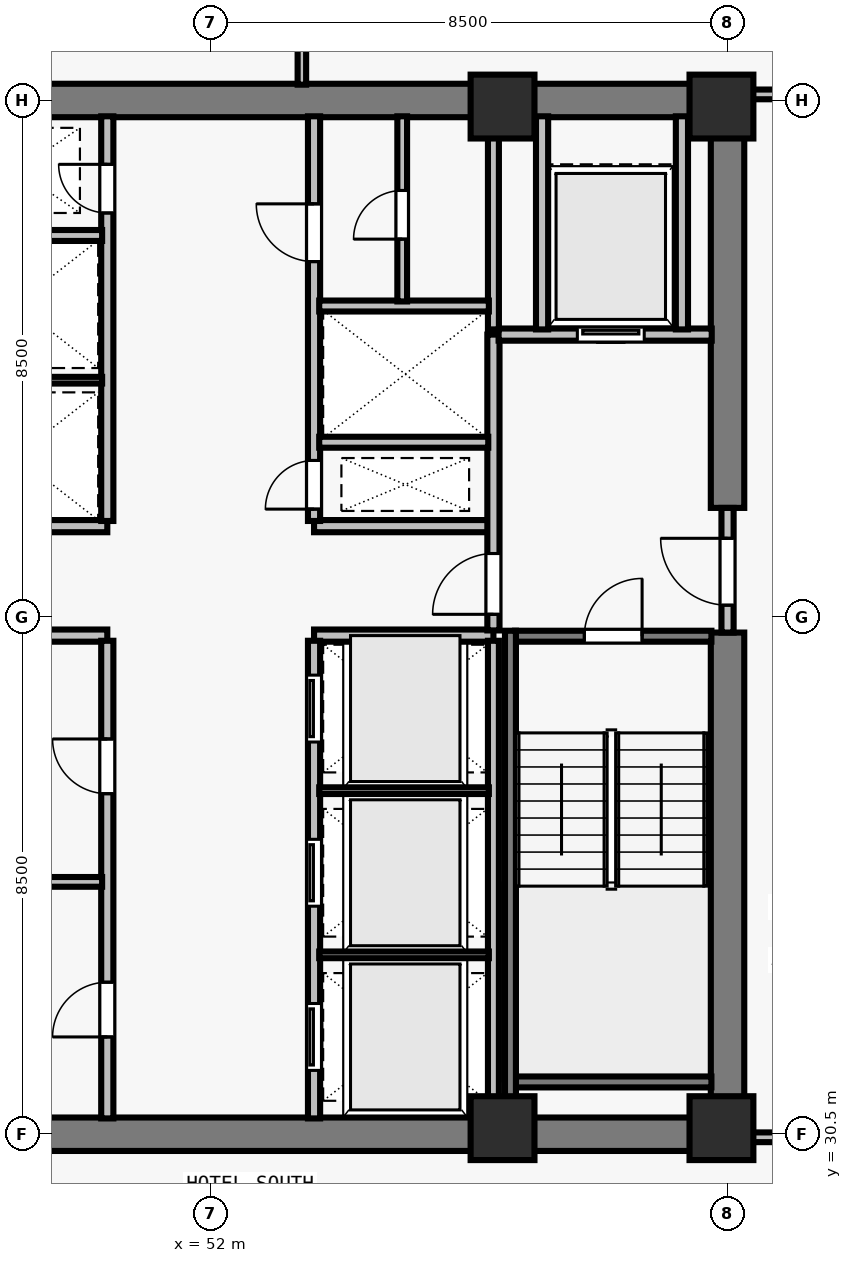
"""IFC4 building model, lengths in metres.
Left out: names, types, materials, properties, quantities, classifications, styles, units other than length and angle.
Written with IfcOpenShell. Run it as: python <this file> out.ifc"""

import sys

from ifc_helpers import new_model, si_unit, direction, frame, frame_2d, origin, origin_2d, place, context, subcontext, project, spatial, rectangle, extrude, element, fill, save


model = new_model("IFC4")
c1 = context("Model", 3, precision=1e-05, world=origin(), true_north=direction((0.0, 1.0)))
c2 = subcontext(c1, "Body", "Model", "MODEL_VIEW")
j1 = project(units=[si_unit("LENGTHUNIT", "METRE"), si_unit("PLANEANGLEUNIT", "RADIAN")], contexts=[c1])
p1 = place(None, origin())
s1 = spatial("IfcSite", under=j1, at=p1, CompositionType="ELEMENT")
p2 = place(p1, origin())
s2 = spatial("IfcBuilding", under=s1, at=p2, CompositionType="ELEMENT")
p3 = place(p2, frame((0.0, 0.0, 127.0)))
s3 = spatial("IfcBuildingStorey", under=s2, at=p3, CompositionType="ELEMENT", Elevation=127.0)
for number, where, z_axis, x_axis in (
    (1, (56.8, 30.6, 0.0), (0.0, 0.0, 1.0), (1.0, 0.0, 0.0)),
    (2, (60.4, 30.6, 0.0), (0.0, 0.0, 1.0), (1.0, 0.0, 0.0)),
    (3, (56.8, 47.4, 0.0), (0.0, 0.0, 1.0), (1.0, 0.0, 0.0)),
    (4, (60.4, 47.4, 0.0), (0.0, 0.0, 1.0), (1.0, 0.0, 0.0)),
):
    element("IfcColumn", number, at=place(p3, frame(where, z_axis=z_axis, x_axis=x_axis)), inside=s3, PredefinedType="COLUMN", context=c2, shape_type="SweptSolid", body=[
        extrude(rectangle(XDim=1.05, YDim=1.05, at=origin_2d()), origin(), (0.0, 0.0, 1.0), 3.5),
    ])
for number, where, z_axis, x_axis in (
    (5, (43.225, 30.5, 0.0), (0.0, 0.0, 1.0), (1.0, 0.0, 0.0)),
    (6, (43.225, 47.5, 0.0), (0.0, 0.0, 1.0), (1.0, 0.0, 0.0)),
):
    element("IfcWall", number, at=place(p3, frame(where, z_axis=z_axis, x_axis=x_axis)), inside=s3, PredefinedType="SHEAR", context=c2, shape_type="SweptSolid", body=[
        extrude(rectangle(XDim=17.55, YDim=0.55, at=frame_2d((8.775, 0.0))), origin(), (0.0, 0.0, 1.0), 3.28),
    ])
p4 = place(p3, frame((60.5, 30.765, 0.0), z_axis=(0.0, 0.0, 1.0), x_axis=(0.0, 1.0, 0.0)))
e7 = element("IfcWall", 7, at=p4, inside=s3, PredefinedType="SHEAR", context=c2, shape_type="SweptSolid", body=[
    extrude(rectangle(XDim=7.985, YDim=0.55, at=frame_2d((3.993, 0.0))), origin(), (0.0, 0.0, 1.0), 3.28),
])
p5 = place(p3, frame((60.5, 40.8, 0.0), z_axis=(0.0, 0.0, 1.0), x_axis=(0.0, 1.0, 0.0)))
e8 = element("IfcWall", 8, at=p5, inside=s3, PredefinedType="SHEAR", context=c2, shape_type="SweptSolid", body=[
    extrude(rectangle(XDim=6.435, YDim=0.55, at=frame_2d((3.218, 0.0))), origin(), (0.0, 0.0, 1.0), 3.28),
])
for number, where, z_axis, x_axis in (
    (9, (47.35, 38.7, 0.0), (0.0, 0.0, 1.0), (1.0, 0.0, 0.0)),
    (10, (47.35, 40.5, 0.0), (0.0, 0.0, 1.0), (1.0, 0.0, 0.0)),
    (11, (53.7, 38.7, 0.0), (0.0, 0.0, 1.0), (1.0, 0.0, 0.0)),
    (12, (53.7, 40.5, 0.0), (0.0, 0.0, 1.0), (1.0, 0.0, 0.0)),
):
    element("IfcWall", number, at=place(p3, frame(where, z_axis=z_axis, x_axis=x_axis)), inside=s3, PredefinedType="SOLIDWALL", context=c2, shape_type="SweptSolid", body=[
        extrude(rectangle(XDim=2.95, YDim=0.2, at=frame_2d((1.475, 0.0))), origin(), (0.0, 0.0, 1.0), 3.28),
    ])
p6 = place(p3, frame((50.3, 30.76, 0.0), z_axis=(0.0, 0.0, 1.0), x_axis=(0.0, 1.0, 0.0)))
e13 = element("IfcWall", 13, at=p6, inside=s3, PredefinedType="SOLIDWALL", context=c2, shape_type="SweptSolid", body=[
    extrude(rectangle(XDim=7.855, YDim=0.2, at=frame_2d((3.927, 0.0))), origin(), (0.0, 0.0, 1.0), 3.28),
])
p7 = place(p6, frame((1.34, 0.0, 0.0)))
e14 = element("IfcOpeningElement", 14, at=p7, cuts=e13, PredefinedType="OPENING", context=c2, shape_type="SweptSolid", body=[
    extrude(rectangle(XDim=0.9, YDim=2.12, at=frame_2d((0.45, 1.06))), frame((0.0, 0.11, 0.0), z_axis=(0.0, -1.0, 0.0), x_axis=(1.0, 0.0, 0.0)), (0.0, 0.0, 1.0), 0.22),
])
p8 = place(p6, frame((5.34, 0.0, 0.0)))
e15 = element("IfcOpeningElement", 15, at=p8, cuts=e13, PredefinedType="OPENING", context=c2, shape_type="SweptSolid", body=[
    extrude(rectangle(XDim=0.9, YDim=2.12, at=frame_2d((0.45, 1.06))), frame((0.0, 0.11, 0.0), z_axis=(0.0, -1.0, 0.0), x_axis=(1.0, 0.0, 0.0)), (0.0, 0.0, 1.0), 0.22),
])
p9 = place(p3, frame((53.7, 30.76, 0.0), z_axis=(0.0, 0.0, 1.0), x_axis=(0.0, 1.0, 0.0)))
e16 = element("IfcWall", 16, at=p9, inside=s3, PredefinedType="SOLIDWALL", context=c2, shape_type="SweptSolid", body=[
    extrude(rectangle(XDim=7.855, YDim=0.2, at=frame_2d((3.927, 0.0))), origin(), (0.0, 0.0, 1.0), 3.28),
])
p10 = place(p9, frame((0.79, 0.0, 0.0)))
e17 = element("IfcOpeningElement", 17, at=p10, cuts=e16, PredefinedType="OPENING", context=c2, shape_type="SweptSolid", body=[
    extrude(rectangle(XDim=1.1, YDim=2.2, at=frame_2d((0.55, 1.1))), frame((0.0, 0.11, 0.0), z_axis=(0.0, -1.0, 0.0), x_axis=(1.0, 0.0, 0.0)), (0.0, 0.0, 1.0), 0.22),
])
p11 = place(p9, frame((3.49, 0.0, 0.0)))
e18 = element("IfcOpeningElement", 18, at=p11, cuts=e16, PredefinedType="OPENING", context=c2, shape_type="SweptSolid", body=[
    extrude(rectangle(XDim=1.1, YDim=2.2, at=frame_2d((0.55, 1.1))), frame((0.0, 0.11, 0.0), z_axis=(0.0, -1.0, 0.0), x_axis=(1.0, 0.0, 0.0)), (0.0, 0.0, 1.0), 0.22),
])
p12 = place(p9, frame((6.19, 0.0, 0.0)))
e19 = element("IfcOpeningElement", 19, at=p12, cuts=e16, PredefinedType="OPENING", context=c2, shape_type="SweptSolid", body=[
    extrude(rectangle(XDim=1.1, YDim=2.2, at=frame_2d((0.55, 1.1))), frame((0.0, 0.11, 0.0), z_axis=(0.0, -1.0, 0.0), x_axis=(1.0, 0.0, 0.0)), (0.0, 0.0, 1.0), 0.22),
])
p13 = place(p3, frame((50.3, 40.585, 0.0), z_axis=(0.0, 0.0, 1.0), x_axis=(0.0, 1.0, 0.0)))
e20 = element("IfcWall", 20, at=p13, inside=s3, PredefinedType="SOLIDWALL", context=c2, shape_type="SweptSolid", body=[
    extrude(rectangle(XDim=6.655, YDim=0.2, at=frame_2d((3.328, 0.0))), origin(), (0.0, 0.0, 1.0), 3.28),
])
p14 = place(p13, frame((5.065, 0.0, 0.0)))
e21 = element("IfcOpeningElement", 21, at=p14, cuts=e20, PredefinedType="OPENING", context=c2, shape_type="SweptSolid", body=[
    extrude(rectangle(XDim=0.8, YDim=2.08, at=frame_2d((0.4, 1.04))), frame((0.0, 0.11, 0.0), z_axis=(0.0, -1.0, 0.0), x_axis=(1.0, 0.0, 0.0)), (0.0, 0.0, 1.0), 0.22),
])
p15 = place(p3, frame((53.7, 40.585, 0.0), z_axis=(0.0, 0.0, 1.0), x_axis=(0.0, 1.0, 0.0)))
e22 = element("IfcWall", 22, at=p15, inside=s3, PredefinedType="SOLIDWALL", context=c2, shape_type="SweptSolid", body=[
    extrude(rectangle(XDim=6.655, YDim=0.2, at=frame_2d((3.328, 0.0))), origin(), (0.0, 0.0, 1.0), 3.28),
])
p16 = place(p15, frame((0.195, 0.0, 0.0)))
e23 = element("IfcOpeningElement", 23, at=p16, cuts=e22, PredefinedType="OPENING", context=c2, shape_type="SweptSolid", body=[
    extrude(rectangle(XDim=0.8, YDim=2.08, at=frame_2d((0.4, 1.04))), frame((0.0, 0.11, 0.0), z_axis=(0.0, -1.0, 0.0), x_axis=(1.0, 0.0, 0.0)), (0.0, 0.0, 1.0), 0.22),
])
p17 = place(p15, frame((4.265, 0.0, 0.0)))
e24 = element("IfcOpeningElement", 24, at=p17, cuts=e22, PredefinedType="OPENING", context=c2, shape_type="SweptSolid", body=[
    extrude(rectangle(XDim=0.95, YDim=2.12, at=frame_2d((0.475, 1.06))), frame((0.0, 0.11, 0.0), z_axis=(0.0, -1.0, 0.0), x_axis=(1.0, 0.0, 0.0)), (0.0, 0.0, 1.0), 0.22),
])
p18 = place(p3, frame((60.5, 38.75, 0.0), z_axis=(0.0, 0.0, 1.0), x_axis=(0.0, 1.0, 0.0)))
e25 = element("IfcWall", 25, at=p18, inside=s3, PredefinedType="SOLIDWALL", context=c2, shape_type="SweptSolid", body=[
    extrude(rectangle(XDim=2.05, YDim=0.2, at=frame_2d((1.025, 0.0))), origin(), (0.0, 0.0, 1.0), 3.28),
])
p19 = place(p18, frame((0.45, 0.0, 0.0)))
e26 = element("IfcOpeningElement", 26, at=p19, cuts=e25, PredefinedType="OPENING", context=c2, shape_type="SweptSolid", body=[
    extrude(rectangle(XDim=1.1, YDim=2.15, at=frame_2d((0.55, 1.075))), frame((0.0, 0.11, 0.0), z_axis=(0.0, -1.0, 0.0), x_axis=(1.0, 0.0, 0.0)), (0.0, 0.0, 1.0), 0.22),
])
p20 = place(p3, frame((56.65, 38.785, 0.0), z_axis=(0.0, 0.0, 1.0), x_axis=(0.0, 1.0, 0.0)))
e27 = element("IfcWall", 27, at=p20, inside=s3, PredefinedType="SOLIDWALL", context=c2, shape_type="SweptSolid", body=[
    extrude(rectangle(XDim=4.865, YDim=0.2, at=frame_2d((2.433, 0.0))), origin(), (0.0, 0.0, 1.0), 3.28),
])
p21 = place(p20, frame((0.265, 0.0, 0.0)))
e28 = element("IfcOpeningElement", 28, at=p21, cuts=e27, PredefinedType="OPENING", context=c2, shape_type="SweptSolid", body=[
    extrude(rectangle(XDim=1.0, YDim=2.15, at=frame_2d((0.5, 1.075))), frame((0.0, 0.11, 0.0), z_axis=(0.0, -1.0, 0.0), x_axis=(1.0, 0.0, 0.0)), (0.0, 0.0, 1.0), 0.22),
])
p22 = place(p3, frame((56.735, 43.65, 0.0), z_axis=(0.0, 0.0, 1.0), x_axis=(1.0, 0.0, 0.0)))
e29 = element("IfcWall", 29, at=p22, inside=s3, PredefinedType="SOLIDWALL", context=c2, shape_type="SweptSolid", body=[
    extrude(rectangle(XDim=3.505, YDim=0.2, at=frame_2d((1.752, 0.0))), origin(), (0.0, 0.0, 1.0), 3.28),
])
p23 = place(p22, frame((1.295, 0.0, 0.0)))
e30 = element("IfcOpeningElement", 30, at=p23, cuts=e29, PredefinedType="OPENING", context=c2, shape_type="SweptSolid", body=[
    extrude(rectangle(XDim=1.1, YDim=2.2, at=frame_2d((0.55, 1.1))), frame((0.0, 0.11, 0.0), z_axis=(0.0, -1.0, 0.0), x_axis=(1.0, 0.0, 0.0)), (0.0, 0.0, 1.0), 0.22),
])
for number, where, z_axis, x_axis in (
    (31, (57.45, 43.735, 0.0), (0.0, 0.0, 1.0), (0.0, 1.0, 0.0)),
    (32, (59.75, 43.735, 0.0), (0.0, 0.0, 1.0), (0.0, 1.0, 0.0)),
):
    element("IfcWall", number, at=place(p3, frame(where, z_axis=z_axis, x_axis=x_axis)), inside=s3, PredefinedType="SOLIDWALL", context=c2, shape_type="SweptSolid", body=[
        extrude(rectangle(XDim=3.505, YDim=0.2, at=frame_2d((1.752, 0.0))), origin(), (0.0, 0.0, 1.0), 3.28),
    ])
p24 = place(p3, frame((47.415, 34.65, 0.0), z_axis=(0.0, 0.0, 1.0), x_axis=(1.0, 0.0, 0.0)))
e33 = element("IfcWall", 33, at=p24, inside=s3, PredefinedType="PARTITIONING", context=c2, shape_type="SweptSolid", body=[
    extrude(rectangle(XDim=2.8, YDim=0.16, at=frame_2d((1.4, 0.0))), origin(), (0.0, 0.0, 1.0), 3.28),
])
p25 = place(p3, frame((56.65, 30.76, 0.0), z_axis=(0.0, 0.0, 1.0), x_axis=(0.0, 1.0, 0.0)))
e34 = element("IfcWall", 34, at=p25, inside=s3, PredefinedType="SOLIDWALL", context=c2, shape_type="SweptSolid", body=[
    extrude(rectangle(XDim=7.855, YDim=0.18, at=frame_2d((3.927, 0.0))), origin(), (0.0, 0.0, 1.0), 3.28),
])
for number, where, z_axis, x_axis in (
    (35, (53.785, 33.45, 0.0), (0.0, 0.0, 1.0), (1.0, 0.0, 0.0)),
    (36, (53.785, 36.15, 0.0), (0.0, 0.0, 1.0), (1.0, 0.0, 0.0)),
):
    element("IfcWall", number, at=place(p3, frame(where, z_axis=z_axis, x_axis=x_axis)), inside=s3, PredefinedType="PARTITIONING", context=c2, shape_type="SweptSolid", body=[
        extrude(rectangle(XDim=2.79, YDim=0.11, at=frame_2d((1.395, 0.0))), origin(), (0.0, 0.0, 1.0), 3.28),
    ])
p26 = place(p3, frame((47.435, 42.9, 0.0), z_axis=(0.0, 0.0, 1.0), x_axis=(1.0, 0.0, 0.0)))
e37 = element("IfcWall", 37, at=p26, inside=s3, PredefinedType="PARTITIONING", context=c2, shape_type="SweptSolid", body=[
    extrude(rectangle(XDim=2.78, YDim=0.11, at=frame_2d((1.39, 0.0))), origin(), (0.0, 0.0, 1.0), 3.28),
])
p27 = place(p3, frame((47.425, 45.28, 0.0), z_axis=(0.0, 0.0, 1.0), x_axis=(1.0, 0.0, 0.0)))
e38 = element("IfcWall", 38, at=p27, inside=s3, PredefinedType="SOLIDWALL", context=c2, shape_type="SweptSolid", body=[
    extrude(rectangle(XDim=2.79, YDim=0.18, at=frame_2d((1.395, 0.0))), origin(), (0.0, 0.0, 1.0), 3.28),
])
p28 = place(p3, frame((56.65, 43.735, 0.0), z_axis=(0.0, 0.0, 1.0), x_axis=(0.0, 1.0, 0.0)))
e39 = element("IfcWall", 39, at=p28, inside=s3, PredefinedType="SOLIDWALL", context=c2, shape_type="SweptSolid", body=[
    extrude(rectangle(XDim=3.505, YDim=0.18, at=frame_2d((1.752, 0.0))), origin(), (0.0, 0.0, 1.0), 3.28),
])
p29 = place(p3, frame((53.785, 41.88, 0.0), z_axis=(0.0, 0.0, 1.0), x_axis=(1.0, 0.0, 0.0)))
e40 = element("IfcWall", 40, at=p29, inside=s3, PredefinedType="SOLIDWALL", context=c2, shape_type="SweptSolid", body=[
    extrude(rectangle(XDim=2.78, YDim=0.18, at=frame_2d((1.39, 0.0))), origin(), (0.0, 0.0, 1.0), 3.28),
])
p30 = place(p3, frame((53.785, 44.12, 0.0), z_axis=(0.0, 0.0, 1.0), x_axis=(1.0, 0.0, 0.0)))
e41 = element("IfcWall", 41, at=p30, inside=s3, PredefinedType="SOLIDWALL", context=c2, shape_type="SweptSolid", body=[
    extrude(rectangle(XDim=2.79, YDim=0.18, at=frame_2d((1.395, 0.0))), origin(), (0.0, 0.0, 1.0), 3.28),
])
p31 = place(p3, frame((55.15, 44.195, 0.0), z_axis=(0.0, 0.0, 1.0), x_axis=(0.0, 1.0, 0.0)))
e42 = element("IfcWall", 42, at=p31, inside=s3, PredefinedType="PARTITIONING", context=c2, shape_type="SweptSolid", body=[
    extrude(rectangle(XDim=3.045, YDim=0.16, at=frame_2d((1.522, 0.0))), origin(), (0.0, 0.0, 1.0), 3.28),
])
p32 = place(p31, frame((1.025, 0.0, 0.0)))
e43 = element("IfcOpeningElement", 43, at=p32, cuts=e42, PredefinedType="OPENING", context=c2, shape_type="SweptSolid", body=[
    extrude(rectangle(XDim=0.8, YDim=2.1, at=frame_2d((0.4, 1.05))), frame((0.0, 0.09, 0.0), z_axis=(0.0, -1.0, 0.0), x_axis=(1.0, 0.0, 0.0)), (0.0, 0.0, 1.0), 0.18),
])
p33 = place(p3, frame((60.765, 30.45, 0.0), z_axis=(0.0, 0.0, 1.0), x_axis=(1.0, 0.0, 0.0)))
e44 = element("IfcWall", 44, at=p33, inside=s3, PredefinedType="PARTITIONING", context=c2, shape_type="SweptSolid", body=[
    extrude(rectangle(XDim=2.985, YDim=0.16, at=frame_2d((1.493, 0.0))), origin(), (0.0, 0.0, 1.0), 3.28),
])
p34 = place(p3, frame((60.765, 47.6, 0.0), z_axis=(0.0, 0.0, 1.0), x_axis=(1.0, 0.0, 0.0)))
e45 = element("IfcWall", 45, at=p34, inside=s3, PredefinedType="PARTITIONING", context=c2, shape_type="SweptSolid", body=[
    extrude(rectangle(XDim=2.92, YDim=0.16, at=frame_2d((1.46, 0.0))), origin(), (0.0, 0.0, 1.0), 3.28),
])
p35 = place(p3, frame((53.5, 47.76, 0.0), z_axis=(0.0, 0.0, 1.0), x_axis=(0.0, 1.0, 0.0)))
e46 = element("IfcWall", 46, at=p35, inside=s3, PredefinedType="PARTITIONING", context=c2, shape_type="SweptSolid", body=[
    extrude(rectangle(XDim=14.915, YDim=0.14, at=frame_2d((7.458, 0.0))), origin(), (0.0, 0.0, 1.0), 2.896),
])
p36 = place(p3, frame((57.005, 38.69, 0.0), z_axis=(0.0, 0.0, 1.0), x_axis=(1.0, 0.0, 0.0)))
e47 = element("IfcWall", 47, at=p36, inside=s3, PredefinedType="SOLIDWALL", context=c2, shape_type="SweptSolid", body=[
    extrude(rectangle(XDim=3.23, YDim=0.18, at=frame_2d((1.615, 0.0))), origin(), (0.0, 0.0, 1.0), 3.28),
])
p37 = place(p36, frame((1.14, 0.0, 0.0)))
e48 = element("IfcOpeningElement", 48, at=p37, cuts=e47, PredefinedType="OPENING", context=c2, shape_type="SweptSolid", body=[
    extrude(rectangle(XDim=0.95, YDim=2.15, at=frame_2d((0.475, 1.075))), frame((0.0, 0.1, 0.0), z_axis=(0.0, -1.0, 0.0), x_axis=(1.0, 0.0, 0.0)), (0.0, 0.0, 1.0), 0.2),
])
p38 = place(p3, frame((57.005, 31.36, 0.0), z_axis=(0.0, 0.0, 1.0), x_axis=(1.0, 0.0, 0.0)))
e49 = element("IfcWall", 49, at=p38, inside=s3, PredefinedType="SOLIDWALL", context=c2, shape_type="SweptSolid", body=[
    extrude(rectangle(XDim=3.23, YDim=0.18, at=frame_2d((1.615, 0.0))), origin(), (0.0, 0.0, 1.0), 3.28),
])
p39 = place(p3, frame((56.93, 38.78, 0.0), z_axis=(0.0, 0.0, 1.0), x_axis=(0.0, -1.0, 0.0)))
e50 = element("IfcWall", 50, at=p39, inside=s3, PredefinedType="SOLIDWALL", context=c2, shape_type="SweptSolid", body=[
    extrude(rectangle(XDim=8.017, YDim=0.18, at=frame_2d((4.009, 0.0))), origin(), (0.0, 0.0, 1.0), 3.28),
])
p40 = place(p19, origin())
e51 = element("IfcDoor", 51, at=p40, inside=s3, OperationType="SINGLE_SWING_RIGHT", PredefinedType="DOOR", context=c2, shape_type="SweptSolid", body=[
    extrude(rectangle(XDim=1.1, YDim=2.15, at=frame_2d((0.55, 1.075))), frame((0.0, 0.025, 0.0), z_axis=(0.0, -1.0, 0.0), x_axis=(1.0, 0.0, 0.0)), (0.0, 0.0, 1.0), 0.05),
])
fill(e26, e51)
p41 = place(p21, origin())
e52 = element("IfcDoor", 52, at=p41, inside=s3, OperationType="SINGLE_SWING_LEFT", PredefinedType="DOOR", context=c2, shape_type="SweptSolid", body=[
    extrude(rectangle(XDim=1.0, YDim=2.15, at=frame_2d((0.5, 1.075))), frame((0.0, 0.025, 0.0), z_axis=(0.0, -1.0, 0.0), x_axis=(1.0, 0.0, 0.0)), (0.0, 0.0, 1.0), 0.05),
])
fill(e28, e52)
p42 = place(p23, origin())
e53 = element("IfcDoor", 53, at=p42, inside=s3, OperationType="SLIDING_TO_LEFT", PredefinedType="DOOR", context=c2, shape_type="SweptSolid", body=[
    extrude(rectangle(XDim=1.1, YDim=2.2, at=frame_2d((0.55, 1.1))), frame((0.0, 0.025, 0.0), z_axis=(0.0, -1.0, 0.0), x_axis=(1.0, 0.0, 0.0)), (0.0, 0.0, 1.0), 0.05),
])
fill(e30, e53)
p43 = place(p7, origin())
e54 = element("IfcDoor", 54, at=p43, inside=s3, OperationType="SINGLE_SWING_LEFT", PredefinedType="DOOR", context=c2, shape_type="SweptSolid", body=[
    extrude(rectangle(XDim=0.9, YDim=2.12, at=frame_2d((0.45, 1.06))), frame((0.0, 0.025, 0.0), z_axis=(0.0, -1.0, 0.0), x_axis=(1.0, 0.0, 0.0)), (0.0, 0.0, 1.0), 0.05),
])
fill(e14, e54)
p44 = place(p8, origin())
e55 = element("IfcDoor", 55, at=p44, inside=s3, OperationType="SINGLE_SWING_RIGHT", PredefinedType="DOOR", context=c2, shape_type="SweptSolid", body=[
    extrude(rectangle(XDim=0.9, YDim=2.12, at=frame_2d((0.45, 1.06))), frame((0.0, 0.025, 0.0), z_axis=(0.0, -1.0, 0.0), x_axis=(1.0, 0.0, 0.0)), (0.0, 0.0, 1.0), 0.05),
])
fill(e15, e55)
p45 = place(p10, origin())
e56 = element("IfcDoor", 56, at=p45, inside=s3, OperationType="SLIDING_TO_LEFT", PredefinedType="DOOR", context=c2, shape_type="SweptSolid", body=[
    extrude(rectangle(XDim=1.1, YDim=2.2, at=frame_2d((0.55, 1.1))), frame((0.0, 0.025, 0.0), z_axis=(0.0, -1.0, 0.0), x_axis=(1.0, 0.0, 0.0)), (0.0, 0.0, 1.0), 0.05),
])
fill(e17, e56)
p46 = place(p11, origin())
e57 = element("IfcDoor", 57, at=p46, inside=s3, OperationType="SLIDING_TO_LEFT", PredefinedType="DOOR", context=c2, shape_type="SweptSolid", body=[
    extrude(rectangle(XDim=1.1, YDim=2.2, at=frame_2d((0.55, 1.1))), frame((0.0, 0.025, 0.0), z_axis=(0.0, -1.0, 0.0), x_axis=(1.0, 0.0, 0.0)), (0.0, 0.0, 1.0), 0.05),
])
fill(e18, e57)
p47 = place(p12, origin())
e58 = element("IfcDoor", 58, at=p47, inside=s3, OperationType="SLIDING_TO_LEFT", PredefinedType="DOOR", context=c2, shape_type="SweptSolid", body=[
    extrude(rectangle(XDim=1.1, YDim=2.2, at=frame_2d((0.55, 1.1))), frame((0.0, 0.025, 0.0), z_axis=(0.0, -1.0, 0.0), x_axis=(1.0, 0.0, 0.0)), (0.0, 0.0, 1.0), 0.05),
])
fill(e19, e58)
p48 = place(p14, origin())
e59 = element("IfcDoor", 59, at=p48, inside=s3, OperationType="SINGLE_SWING_RIGHT", PredefinedType="DOOR", context=c2, shape_type="SweptSolid", body=[
    extrude(rectangle(XDim=0.8, YDim=2.08, at=frame_2d((0.4, 1.04))), frame((0.0, 0.025, 0.0), z_axis=(0.0, -1.0, 0.0), x_axis=(1.0, 0.0, 0.0)), (0.0, 0.0, 1.0), 0.05),
])
fill(e21, e59)
p49 = place(p16, origin())
e60 = element("IfcDoor", 60, at=p49, inside=s3, OperationType="SINGLE_SWING_LEFT", PredefinedType="DOOR", context=c2, shape_type="SweptSolid", body=[
    extrude(rectangle(XDim=0.8, YDim=2.08, at=frame_2d((0.4, 1.04))), frame((0.0, 0.025, 0.0), z_axis=(0.0, -1.0, 0.0), x_axis=(1.0, 0.0, 0.0)), (0.0, 0.0, 1.0), 0.05),
])
fill(e23, e60)
p50 = place(p17, origin())
e61 = element("IfcDoor", 61, at=p50, inside=s3, OperationType="SINGLE_SWING_RIGHT", PredefinedType="DOOR", context=c2, shape_type="SweptSolid", body=[
    extrude(rectangle(XDim=0.95, YDim=2.12, at=frame_2d((0.475, 1.06))), frame((0.0, 0.025, 0.0), z_axis=(0.0, -1.0, 0.0), x_axis=(1.0, 0.0, 0.0)), (0.0, 0.0, 1.0), 0.05),
])
fill(e24, e61)
p51 = place(p32, origin())
e62 = element("IfcDoor", 62, at=p51, inside=s3, OperationType="SINGLE_SWING_LEFT", PredefinedType="DOOR", context=c2, shape_type="SweptSolid", body=[
    extrude(rectangle(XDim=0.8, YDim=2.1, at=frame_2d((0.4, 1.05))), frame((0.0, 0.025, 0.0), z_axis=(0.0, -1.0, 0.0), x_axis=(1.0, 0.0, 0.0)), (0.0, 0.0, 1.0), 0.05),
])
fill(e43, e62)
p52 = place(p37, origin())
e63 = element("IfcDoor", 63, at=p52, inside=s3, OperationType="SINGLE_SWING_RIGHT", PredefinedType="DOOR", context=c2, shape_type="SweptSolid", body=[
    extrude(rectangle(XDim=0.95, YDim=2.15, at=frame_2d((0.475, 1.075))), frame((0.0, 0.025, 0.0), z_axis=(0.0, -1.0, 0.0), x_axis=(1.0, 0.0, 0.0)), (0.0, 0.0, 1.0), 0.05),
])
fill(e48, e63)
save(model, sys.argv[1])
